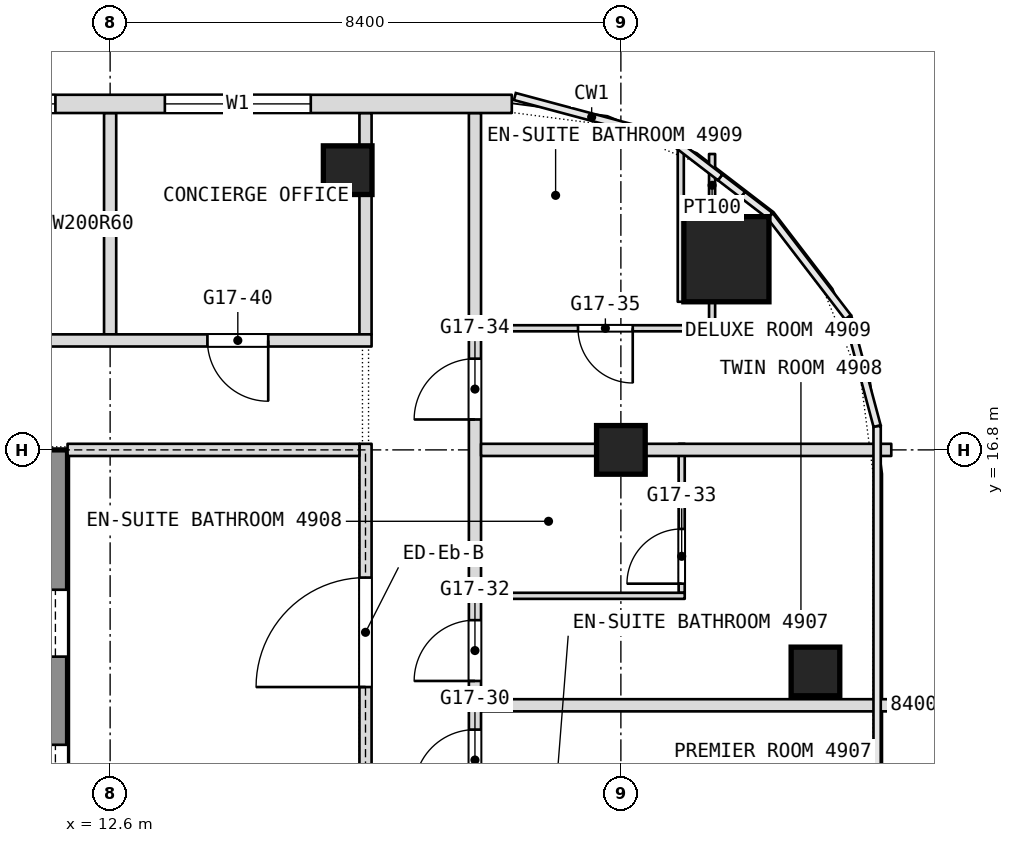
"""IFC4 building model, lengths in metres.
Left out: names, types, materials, properties, quantities, classifications, styles, units other than length and angle.
Written with IfcOpenShell. Run it as: python <this file> out.ifc"""

import sys

from ifc_helpers import new_model, si_unit, direction, frame, frame_2d, origin, origin_2d, place, context, subcontext, project, spatial, rectangle, extrude, element, fill, save


model = new_model("IFC4")
c1 = context("Model", 3, precision=1e-05, world=origin(), true_north=direction((0.0, 1.0)))
c2 = subcontext(c1, "Body", "Model", "MODEL_VIEW")
j1 = project(units=[si_unit("LENGTHUNIT", "METRE"), si_unit("PLANEANGLEUNIT", "RADIAN")], contexts=[c1])
p1 = place(None, origin())
s1 = spatial("IfcSite", under=j1, at=p1, CompositionType="ELEMENT")
p2 = place(p1, origin())
s2 = spatial("IfcBuilding", under=s1, at=p2, CompositionType="ELEMENT")
p3 = place(p2, frame((0.0, 0.0, 212.9)))
s3 = spatial("IfcBuildingStorey", under=s2, at=p3, CompositionType="ELEMENT", Elevation=212.9)
p4 = place(p3, frame((11.5, 0.0, 0.0), z_axis=(0.0, 0.0, 1.0), x_axis=(0.0, 1.0, 0.0)))
e1 = element("IfcWall", 1, at=p4, inside=s3, PredefinedType="SHEAR", context=c2, shape_type="SweptSolid", body=[
    extrude(rectangle(XDim=16.8, YDim=0.8, at=frame_2d((8.4, 0.0))), origin(), (0.0, 0.0, 1.0), 3.6),
])
p5 = place(p4, frame((2.3, 0.0, 0.0)))
e2 = element("IfcOpeningElement", 2, at=p5, cuts=e1, PredefinedType="OPENING", context=c2, shape_type="SweptSolid", body=[
    extrude(rectangle(XDim=1.1, YDim=2.1, at=frame_2d((0.55, 1.05))), frame((0.0, 0.4, 0.0), z_axis=(0.0, -1.0, 0.0), x_axis=(1.0, 0.0, 0.0)), (0.0, 0.0, 1.0), 0.8),
])
p6 = place(p4, frame((4.85, 0.0, 0.0)))
e3 = element("IfcOpeningElement", 3, at=p6, cuts=e1, PredefinedType="OPENING", context=c2, shape_type="SweptSolid", body=[
    extrude(rectangle(XDim=1.1, YDim=2.1, at=frame_2d((0.55, 1.05))), frame((0.0, 0.4, 0.0), z_axis=(0.0, -1.0, 0.0), x_axis=(1.0, 0.0, 0.0)), (0.0, 0.0, 1.0), 0.8),
])
p7 = place(p4, frame((6.825, 0.0, 0.0)))
e4 = element("IfcOpeningElement", 4, at=p7, cuts=e1, PredefinedType="OPENING", context=c2, shape_type="SweptSolid", body=[
    extrude(rectangle(XDim=1.2, YDim=2.1, at=frame_2d((0.6, 1.05))), frame((0.0, 0.4, 0.0), z_axis=(0.0, -1.0, 0.0), x_axis=(1.0, 0.0, 0.0)), (0.0, 0.0, 1.0), 0.8),
])
p8 = place(p4, frame((13.4, 0.0, 0.0)))
e5 = element("IfcOpeningElement", 5, at=p8, cuts=e1, PredefinedType="OPENING", context=c2, shape_type="SweptSolid", body=[
    extrude(rectangle(XDim=1.1, YDim=2.1, at=frame_2d((0.55, 1.05))), frame((0.0, 0.4, 0.0), z_axis=(0.0, -1.0, 0.0), x_axis=(1.0, 0.0, 0.0)), (0.0, 0.0, 1.0), 0.8),
])
p9 = place(p4, frame((10.85, 0.0, 0.0)))
e6 = element("IfcOpeningElement", 6, at=p9, cuts=e1, PredefinedType="OPENING", context=c2, shape_type="SweptSolid", body=[
    extrude(rectangle(XDim=1.1, YDim=2.1, at=frame_2d((0.55, 1.05))), frame((0.0, 0.4, 0.0), z_axis=(0.0, -1.0, 0.0), x_axis=(1.0, 0.0, 0.0)), (0.0, 0.0, 1.0), 0.8),
])
p10 = place(p4, frame((8.775, 0.0, 0.0)))
e7 = element("IfcOpeningElement", 7, at=p10, cuts=e1, PredefinedType="OPENING", context=c2, shape_type="SweptSolid", body=[
    extrude(rectangle(XDim=1.2, YDim=2.1, at=frame_2d((0.6, 1.05))), frame((0.0, 0.4, 0.0), z_axis=(0.0, -1.0, 0.0), x_axis=(1.0, 0.0, 0.0)), (0.0, 0.0, 1.0), 0.8),
])
p11 = place(p3, frame((22.736, 19.936, 0.0), z_axis=(0.0, 0.0, 1.0), x_axis=(1.0, 0.0, 0.0)))
e8 = element("IfcColumn", 8, at=p11, inside=s3, PredefinedType="COLUMN", context=c2, shape_type="SweptSolid", body=[
    extrude(rectangle(XDim=1.4, YDim=1.4, at=origin_2d()), origin(), (0.0, 0.0, 1.0), 3.6),
])
for number, where, z_axis, x_axis in (
    (9, (21.0, 16.8, 0.0), (0.0, 0.0, 1.0), (1.0, 0.0, 0.0)),
    (10, (16.507, 21.4, 0.0), (0.0, 0.0, 1.0), (1.0, 0.0, 0.0)),
    (11, (24.2, 13.156, 0.0), (0.0, 0.0, 1.0), (1.0, 0.0, 0.0)),
):
    element("IfcColumn", number, at=place(p3, frame(where, z_axis=z_axis, x_axis=x_axis)), inside=s3, PredefinedType="COLUMN", context=c2, shape_type="SweptSolid", body=[
        extrude(rectangle(XDim=0.8, YDim=0.8, at=origin_2d()), origin(), (0.0, 0.0, 1.0), 3.6),
    ])
p12 = place(p3, frame((22.5, 18.85, 0.0), z_axis=(0.0, 0.0, 1.0), x_axis=(0.0, 1.0, 0.0)))
e12 = element("IfcWall", 12, at=p12, inside=s3, PredefinedType="PARTITIONING", context=c2, shape_type="SweptSolid", body=[
    extrude(rectangle(XDim=0.386, YDim=0.1, at=frame_2d((0.193, 0.0))), origin(), (0.0, 0.0, 1.0), 3.34),
])
p13 = place(p3, frame((22.5, 20.636, 0.0), z_axis=(0.0, 0.0, 1.0), x_axis=(0.0, 1.0, 0.0)))
e13 = element("IfcWall", 13, at=p13, inside=s3, PredefinedType="PARTITIONING", context=c2, shape_type="SweptSolid", body=[
    extrude(rectangle(XDim=1.03, YDim=0.1, at=frame_2d((0.515, 0.0))), origin(), (0.0, 0.0, 1.0), 3.34),
])
p14 = place(p3, frame((22.0, 14.45, 0.0), z_axis=(0.0, 0.0, 1.0), x_axis=(0.0, 1.0, 0.0)))
e14 = element("IfcWall", 14, at=p14, inside=s3, PredefinedType="PARTITIONING", context=c2, shape_type="SweptSolid", body=[
    extrude(rectangle(XDim=2.45, YDim=0.1, at=frame_2d((1.225, 0.0))), origin(), (0.0, 0.0, 1.0), 3.34),
])
p15 = place(p14, frame((0.15, 0.0, 0.0)))
e15 = element("IfcOpeningElement", 15, at=p15, cuts=e14, PredefinedType="OPENING", context=c2, shape_type="SweptSolid", body=[
    extrude(rectangle(XDim=0.9, YDim=2.1, at=frame_2d((0.45, 1.05))), frame((0.0, 0.05, 0.0), z_axis=(0.0, -1.0, 0.0), x_axis=(1.0, 0.0, 0.0)), (0.0, 0.0, 1.0), 0.1),
])
p16 = place(p3, frame((18.6, -26.751, 0.0), z_axis=(0.0, 0.0, 1.0), x_axis=(0.0, 1.0, 0.0)))
e16 = element("IfcWall", 16, at=p16, inside=s3, PredefinedType="PARTITIONING", context=c2, shape_type="SweptSolid", body=[
    extrude(rectangle(XDim=49.091, YDim=0.2, at=frame_2d((24.545, 0.0))), origin(), (0.0, 0.0, 1.0), 3.34),
])
p17 = place(p16, frame((3.413, 0.0, 0.0)))
e17 = element("IfcOpeningElement", 17, at=p17, cuts=e16, PredefinedType="OPENING", context=c2, shape_type="SweptSolid", body=[
    extrude(rectangle(XDim=1.0, YDim=2.1, at=frame_2d((0.5, 1.05))), frame((0.0, 0.1, 0.0), z_axis=(0.0, -1.0, 0.0), x_axis=(1.0, 0.0, 0.0)), (0.0, 0.0, 1.0), 0.2),
])
p18 = place(p16, frame((5.838, 0.0, 0.0)))
e18 = element("IfcOpeningElement", 18, at=p18, cuts=e16, PredefinedType="OPENING", context=c2, shape_type="SweptSolid", body=[
    extrude(rectangle(XDim=1.0, YDim=2.1, at=frame_2d((0.5, 1.05))), frame((0.0, 0.1, 0.0), z_axis=(0.0, -1.0, 0.0), x_axis=(1.0, 0.0, 0.0)), (0.0, 0.0, 1.0), 0.2),
])
p19 = place(p16, frame((13.551, 0.0, 0.0)))
e19 = element("IfcOpeningElement", 19, at=p19, cuts=e16, PredefinedType="OPENING", context=c2, shape_type="SweptSolid", body=[
    extrude(rectangle(XDim=1.1, YDim=2.1, at=frame_2d((0.55, 1.05))), frame((0.0, 0.1, 0.0), z_axis=(0.0, -1.0, 0.0), x_axis=(1.0, 0.0, 0.0)), (0.0, 0.0, 1.0), 0.2),
])
p20 = place(p16, frame((21.151, 0.0, 0.0)))
e20 = element("IfcOpeningElement", 20, at=p20, cuts=e16, PredefinedType="OPENING", context=c2, shape_type="SweptSolid", body=[
    extrude(rectangle(XDim=1.0, YDim=2.1, at=frame_2d((0.5, 1.05))), frame((0.0, 0.1, 0.0), z_axis=(0.0, -1.0, 0.0), x_axis=(1.0, 0.0, 0.0)), (0.0, 0.0, 1.0), 0.2),
])
p21 = place(p16, frame((22.951, 0.0, 0.0)))
e21 = element("IfcOpeningElement", 21, at=p21, cuts=e16, PredefinedType="OPENING", context=c2, shape_type="SweptSolid", body=[
    extrude(rectangle(XDim=1.0, YDim=2.1, at=frame_2d((0.5, 1.05))), frame((0.0, 0.1, 0.0), z_axis=(0.0, -1.0, 0.0), x_axis=(1.0, 0.0, 0.0)), (0.0, 0.0, 1.0), 0.2),
])
p22 = place(p16, frame((30.351, 0.0, 0.0)))
e22 = element("IfcOpeningElement", 22, at=p22, cuts=e16, PredefinedType="OPENING", context=c2, shape_type="SweptSolid", body=[
    extrude(rectangle(XDim=1.1, YDim=2.1, at=frame_2d((0.55, 1.05))), frame((0.0, 0.1, 0.0), z_axis=(0.0, -1.0, 0.0), x_axis=(1.0, 0.0, 0.0)), (0.0, 0.0, 1.0), 0.2),
])
p23 = place(p16, frame((37.951, 0.0, 0.0)))
e23 = element("IfcOpeningElement", 23, at=p23, cuts=e16, PredefinedType="OPENING", context=c2, shape_type="SweptSolid", body=[
    extrude(rectangle(XDim=1.0, YDim=2.1, at=frame_2d((0.5, 1.05))), frame((0.0, 0.1, 0.0), z_axis=(0.0, -1.0, 0.0), x_axis=(1.0, 0.0, 0.0)), (0.0, 0.0, 1.0), 0.2),
])
p24 = place(p16, frame((39.751, 0.0, 0.0)))
e24 = element("IfcOpeningElement", 24, at=p24, cuts=e16, PredefinedType="OPENING", context=c2, shape_type="SweptSolid", body=[
    extrude(rectangle(XDim=1.0, YDim=2.1, at=frame_2d((0.5, 1.05))), frame((0.0, 0.1, 0.0), z_axis=(0.0, -1.0, 0.0), x_axis=(1.0, 0.0, 0.0)), (0.0, 0.0, 1.0), 0.2),
])
p25 = place(p16, frame((44.051, 0.0, 0.0)))
e25 = element("IfcOpeningElement", 25, at=p25, cuts=e16, PredefinedType="OPENING", context=c2, shape_type="SweptSolid", body=[
    extrude(rectangle(XDim=1.0, YDim=2.1, at=frame_2d((0.5, 1.05))), frame((0.0, 0.1, 0.0), z_axis=(0.0, -1.0, 0.0), x_axis=(1.0, 0.0, 0.0)), (0.0, 0.0, 1.0), 0.2),
])
for number, where, z_axis, x_axis in (
    (26, (16.8, 18.7, 0.0), (0.0, 0.0, 1.0), (0.0, 1.0, 0.0)),
    (27, (12.6, 18.7, 0.0), (0.0, 0.0, 1.0), (0.0, 1.0, 0.0)),
):
    element("IfcWall", number, at=place(p3, frame(where, z_axis=z_axis, x_axis=x_axis)), inside=s3, PredefinedType="PARTITIONING", context=c2, shape_type="SweptSolid", body=[
        extrude(rectangle(XDim=3.64, YDim=0.2, at=frame_2d((1.82, 0.0))), origin(), (0.0, 0.0, 1.0), 3.34),
    ])
p26 = place(p3, frame((18.7, 12.6, 0.0), z_axis=(0.0, 0.0, 1.0), x_axis=(1.0, 0.0, 0.0)))
e28 = element("IfcWall", 28, at=p26, inside=s3, PredefinedType="PARTITIONING", context=c2, shape_type="SweptSolid", body=[
    extrude(rectangle(XDim=6.8, YDim=0.2, at=frame_2d((3.4, 0.0))), origin(), (0.0, 0.0, 1.0), 3.34),
])
p27 = place(p3, frame((18.7, 14.4, 0.0), z_axis=(0.0, 0.0, 1.0), x_axis=(1.0, 0.0, 0.0)))
e29 = element("IfcWall", 29, at=p27, inside=s3, PredefinedType="PARTITIONING", context=c2, shape_type="SweptSolid", body=[
    extrude(rectangle(XDim=3.35, YDim=0.1, at=frame_2d((1.675, 0.0))), origin(), (0.0, 0.0, 1.0), 3.34),
])
p28 = place(p3, frame((18.7, 16.8, 0.0), z_axis=(0.0, 0.0, 1.0), x_axis=(1.0, 0.0, 0.0)))
e30 = element("IfcWall", 30, at=p28, inside=s3, PredefinedType="PARTITIONING", context=c2, shape_type="SweptSolid", body=[
    extrude(rectangle(XDim=6.747, YDim=0.2, at=frame_2d((3.374, 0.0))), origin(), (0.0, 0.0, 1.0), 2.94),
])
p29 = place(p3, frame((-16.9, 18.6, 0.0), z_axis=(0.0, 0.0, 1.0), x_axis=(1.0, 0.0, 0.0)))
e31 = element("IfcWall", 31, at=p29, inside=s3, PredefinedType="PARTITIONING", context=c2, shape_type="SweptSolid", body=[
    extrude(rectangle(XDim=33.8, YDim=0.2, at=frame_2d((16.9, 0.0))), origin(), (0.0, 0.0, 1.0), 3.34),
])
p30 = place(p29, frame((1.7, 0.0, 0.0)))
e32 = element("IfcOpeningElement", 32, at=p30, cuts=e31, PredefinedType="OPENING", context=c2, shape_type="SweptSolid", body=[
    extrude(rectangle(XDim=1.0, YDim=2.1, at=frame_2d((0.5, 1.05))), frame((0.0, 0.1, 0.0), z_axis=(0.0, -1.0, 0.0), x_axis=(1.0, 0.0, 0.0)), (0.0, 0.0, 1.0), 0.2),
])
p31 = place(p29, frame((7.6, 0.0, 0.0)))
e33 = element("IfcOpeningElement", 33, at=p31, cuts=e31, PredefinedType="OPENING", context=c2, shape_type="SweptSolid", body=[
    extrude(rectangle(XDim=1.8, YDim=2.1, at=frame_2d((0.9, 1.05))), frame((0.0, 0.1, 0.0), z_axis=(0.0, -1.0, 0.0), x_axis=(1.0, 0.0, 0.0)), (0.0, 0.0, 1.0), 0.2),
])
p32 = place(p29, frame((16.0, 0.0, 0.0)))
e34 = element("IfcOpeningElement", 34, at=p32, cuts=e31, PredefinedType="OPENING", context=c2, shape_type="SweptSolid", body=[
    extrude(rectangle(XDim=1.8, YDim=2.1, at=frame_2d((0.9, 1.05))), frame((0.0, 0.1, 0.0), z_axis=(0.0, -1.0, 0.0), x_axis=(1.0, 0.0, 0.0)), (0.0, 0.0, 1.0), 0.2),
])
p33 = place(p29, frame((24.4, 0.0, 0.0)))
e35 = element("IfcOpeningElement", 35, at=p33, cuts=e31, PredefinedType="OPENING", context=c2, shape_type="SweptSolid", body=[
    extrude(rectangle(XDim=1.8, YDim=2.1, at=frame_2d((0.9, 1.05))), frame((0.0, 0.1, 0.0), z_axis=(0.0, -1.0, 0.0), x_axis=(1.0, 0.0, 0.0)), (0.0, 0.0, 1.0), 0.2),
])
p34 = place(p29, frame((31.1, 0.0, 0.0)))
e36 = element("IfcOpeningElement", 36, at=p34, cuts=e31, PredefinedType="OPENING", context=c2, shape_type="SweptSolid", body=[
    extrude(rectangle(XDim=1.0, YDim=2.1, at=frame_2d((0.5, 1.05))), frame((0.0, 0.1, 0.0), z_axis=(0.0, -1.0, 0.0), x_axis=(1.0, 0.0, 0.0)), (0.0, 0.0, 1.0), 0.2),
])
p35 = place(p3, frame((18.7, 18.8, 0.0), z_axis=(0.0, 0.0, 1.0), x_axis=(1.0, 0.0, 0.0)))
e37 = element("IfcWall", 37, at=p35, inside=s3, PredefinedType="PARTITIONING", context=c2, shape_type="SweptSolid", body=[
    extrude(rectangle(XDim=3.85, YDim=0.1, at=frame_2d((1.925, 0.0))), origin(), (0.0, 0.0, 1.0), 3.34),
])
p36 = place(p35, frame((1.595, 0.0, 0.0)))
e38 = element("IfcOpeningElement", 38, at=p36, cuts=e37, PredefinedType="OPENING", context=c2, shape_type="SweptSolid", body=[
    extrude(rectangle(XDim=0.9, YDim=2.1, at=frame_2d((0.45, 1.05))), frame((0.0, 0.05, 0.0), z_axis=(0.0, -1.0, 0.0), x_axis=(1.0, 0.0, 0.0)), (0.0, 0.0, 1.0), 0.1),
])
p37 = place(p3, frame((21.985, 19.236, 0.0), z_axis=(0.0, 0.0, 1.0), x_axis=(0.0, 1.0, 0.0)))
e39 = element("IfcWall", 39, at=p37, inside=s3, PredefinedType="PARTITIONING", context=c2, shape_type="SweptSolid", body=[
    extrude(rectangle(XDim=2.513, YDim=0.1, at=frame_2d((1.256, 0.0))), origin(), (0.0, 0.0, 1.0), 3.34),
])
p38 = place(p3, frame((19.206, 22.49, 0.0), z_axis=(0.0, 0.0, 1.0), x_axis=(-1.0, 0.0, 0.0)))
e40 = element("IfcWall", 40, at=p38, inside=s3, PredefinedType="NOTDEFINED", context=c2, shape_type="SweptSolid", body=[
    extrude(rectangle(XDim=38.412, YDim=0.3, at=frame_2d((19.206, 0.0))), origin(), (0.0, 0.0, 1.0), 3.6),
])
p39 = place(p38, frame((3.306, 0.0, 0.9)))
e41 = element("IfcOpeningElement", 41, at=p39, cuts=e40, PredefinedType="OPENING", context=c2, shape_type="SweptSolid", body=[
    extrude(rectangle(XDim=2.4, YDim=2.1, at=frame_2d((1.2, 1.05))), frame((0.0, 0.15, 0.0), z_axis=(0.0, -1.0, 0.0), x_axis=(1.0, 0.0, 0.0)), (0.0, 0.0, 1.0), 0.3),
])
p40 = place(p38, frame((7.506, 0.0, 0.9)))
e42 = element("IfcOpeningElement", 42, at=p40, cuts=e40, PredefinedType="OPENING", context=c2, shape_type="SweptSolid", body=[
    extrude(rectangle(XDim=2.4, YDim=2.1, at=frame_2d((1.2, 1.05))), frame((0.0, 0.15, 0.0), z_axis=(0.0, -1.0, 0.0), x_axis=(1.0, 0.0, 0.0)), (0.0, 0.0, 1.0), 0.3),
])
p41 = place(p38, frame((11.706, 0.0, 0.9)))
e43 = element("IfcOpeningElement", 43, at=p41, cuts=e40, PredefinedType="OPENING", context=c2, shape_type="SweptSolid", body=[
    extrude(rectangle(XDim=2.4, YDim=2.1, at=frame_2d((1.2, 1.05))), frame((0.0, 0.15, 0.0), z_axis=(0.0, -1.0, 0.0), x_axis=(1.0, 0.0, 0.0)), (0.0, 0.0, 1.0), 0.3),
])
p42 = place(p38, frame((15.906, 0.0, 0.9)))
e44 = element("IfcOpeningElement", 44, at=p42, cuts=e40, PredefinedType="OPENING", context=c2, shape_type="SweptSolid", body=[
    extrude(rectangle(XDim=2.4, YDim=2.1, at=frame_2d((1.2, 1.05))), frame((0.0, 0.15, 0.0), z_axis=(0.0, -1.0, 0.0), x_axis=(1.0, 0.0, 0.0)), (0.0, 0.0, 1.0), 0.3),
])
p43 = place(p38, frame((20.106, 0.0, 0.9)))
e45 = element("IfcOpeningElement", 45, at=p43, cuts=e40, PredefinedType="OPENING", context=c2, shape_type="SweptSolid", body=[
    extrude(rectangle(XDim=2.4, YDim=2.1, at=frame_2d((1.2, 1.05))), frame((0.0, 0.15, 0.0), z_axis=(0.0, -1.0, 0.0), x_axis=(1.0, 0.0, 0.0)), (0.0, 0.0, 1.0), 0.3),
])
p44 = place(p38, frame((24.306, 0.0, 0.9)))
e46 = element("IfcOpeningElement", 46, at=p44, cuts=e40, PredefinedType="OPENING", context=c2, shape_type="SweptSolid", body=[
    extrude(rectangle(XDim=2.4, YDim=2.1, at=frame_2d((1.2, 1.05))), frame((0.0, 0.15, 0.0), z_axis=(0.0, -1.0, 0.0), x_axis=(1.0, 0.0, 0.0)), (0.0, 0.0, 1.0), 0.3),
])
p45 = place(p38, frame((28.506, 0.0, 0.9)))
e47 = element("IfcOpeningElement", 47, at=p45, cuts=e40, PredefinedType="OPENING", context=c2, shape_type="SweptSolid", body=[
    extrude(rectangle(XDim=2.4, YDim=2.1, at=frame_2d((1.2, 1.05))), frame((0.0, 0.15, 0.0), z_axis=(0.0, -1.0, 0.0), x_axis=(1.0, 0.0, 0.0)), (0.0, 0.0, 1.0), 0.3),
])
p46 = place(p38, frame((32.706, 0.0, 0.9)))
e48 = element("IfcOpeningElement", 48, at=p46, cuts=e40, PredefinedType="OPENING", context=c2, shape_type="SweptSolid", body=[
    extrude(rectangle(XDim=2.4, YDim=2.1, at=frame_2d((1.2, 1.05))), frame((0.0, 0.15, 0.0), z_axis=(0.0, -1.0, 0.0), x_axis=(1.0, 0.0, 0.0)), (0.0, 0.0, 1.0), 0.3),
])
p47 = place(p3, frame((16.8, -0.1, 0.0), z_axis=(0.0, 0.0, 1.0), x_axis=(0.0, 1.0, 0.0)))
e49 = element("IfcWall", 49, at=p47, inside=s3, PredefinedType="PARTITIONING", context=c2, shape_type="SweptSolid", body=[
    extrude(rectangle(XDim=17.0, YDim=0.2, at=frame_2d((8.5, 0.0))), origin(), (0.0, 0.0, 1.0), 3.34),
])
p48 = place(p47, frame((2.2, 0.0, 0.0)))
e50 = element("IfcOpeningElement", 50, at=p48, cuts=e49, PredefinedType="OPENING", context=c2, shape_type="SweptSolid", body=[
    extrude(rectangle(XDim=1.8, YDim=2.1, at=frame_2d((0.9, 1.05))), frame((0.0, 0.1, 0.0), z_axis=(0.0, -1.0, 0.0), x_axis=(1.0, 0.0, 0.0)), (0.0, 0.0, 1.0), 0.2),
])
p49 = place(p47, frame((13.0, 0.0, 0.0)))
e51 = element("IfcOpeningElement", 51, at=p49, cuts=e49, PredefinedType="OPENING", context=c2, shape_type="SweptSolid", body=[
    extrude(rectangle(XDim=1.8, YDim=2.1, at=frame_2d((0.9, 1.05))), frame((0.0, 0.1, 0.0), z_axis=(0.0, -1.0, 0.0), x_axis=(1.0, 0.0, 0.0)), (0.0, 0.0, 1.0), 0.2),
])
p50 = place(p3, frame((11.9, 16.8, 0.0), z_axis=(0.0, 0.0, 1.0), x_axis=(1.0, 0.0, 0.0)))
e52 = element("IfcWall", 52, at=p50, inside=s3, PredefinedType="PARTITIONING", context=c2, shape_type="SweptSolid", body=[
    extrude(rectangle(XDim=4.8, YDim=0.2, at=frame_2d((2.4, 0.0))), origin(), (0.0, 0.0, 1.0), 2.94),
])
p51 = place(p15, origin())
e53 = element("IfcDoor", 53, at=p51, inside=s3, OperationType="SINGLE_SWING_LEFT", PredefinedType="DOOR", context=c2, shape_type="SweptSolid", body=[
    extrude(rectangle(XDim=0.9, YDim=2.1, at=frame_2d((0.45, 1.05))), frame((0.0, 0.025, 0.0), z_axis=(0.0, -1.0, 0.0), x_axis=(1.0, 0.0, 0.0)), (0.0, 0.0, 1.0), 0.05),
])
fill(e15, e53)
p52 = place(p23, origin())
e54 = element("IfcDoor", 54, at=p52, inside=s3, OperationType="SINGLE_SWING_RIGHT", PredefinedType="DOOR", context=c2, shape_type="SweptSolid", body=[
    extrude(rectangle(XDim=1.0, YDim=2.1, at=frame_2d((0.5, 1.05))), frame((0.0, 0.025, 0.0), z_axis=(0.0, -1.0, 0.0), x_axis=(1.0, 0.0, 0.0)), (0.0, 0.0, 1.0), 0.05),
])
fill(e23, e54)
p53 = place(p24, origin())
e55 = element("IfcDoor", 55, at=p53, inside=s3, OperationType="SINGLE_SWING_RIGHT", PredefinedType="DOOR", context=c2, shape_type="SweptSolid", body=[
    extrude(rectangle(XDim=1.0, YDim=2.1, at=frame_2d((0.5, 1.05))), frame((0.0, 0.025, 0.0), z_axis=(0.0, -1.0, 0.0), x_axis=(1.0, 0.0, 0.0)), (0.0, 0.0, 1.0), 0.05),
])
fill(e24, e55)
p54 = place(p25, origin())
e56 = element("IfcDoor", 56, at=p54, inside=s3, OperationType="SINGLE_SWING_RIGHT", PredefinedType="DOOR", context=c2, shape_type="SweptSolid", body=[
    extrude(rectangle(XDim=1.0, YDim=2.1, at=frame_2d((0.5, 1.05))), frame((0.0, 0.025, 0.0), z_axis=(0.0, -1.0, 0.0), x_axis=(1.0, 0.0, 0.0)), (0.0, 0.0, 1.0), 0.05),
])
fill(e25, e56)
p55 = place(p34, origin())
e57 = element("IfcDoor", 57, at=p55, inside=s3, OperationType="SINGLE_SWING_RIGHT", PredefinedType="DOOR", context=c2, shape_type="SweptSolid", body=[
    extrude(rectangle(XDim=1.0, YDim=2.1, at=frame_2d((0.5, 1.05))), frame((0.0, 0.025, 0.0), z_axis=(0.0, -1.0, 0.0), x_axis=(1.0, 0.0, 0.0)), (0.0, 0.0, 1.0), 0.05),
])
fill(e36, e57)
p56 = place(p36, origin())
e58 = element("IfcDoor", 58, at=p56, inside=s3, OperationType="SINGLE_SWING_RIGHT", PredefinedType="DOOR", context=c2, shape_type="SweptSolid", body=[
    extrude(rectangle(XDim=0.9, YDim=2.1, at=frame_2d((0.45, 1.05))), frame((0.0, 0.025, 0.0), z_axis=(0.0, -1.0, 0.0), x_axis=(1.0, 0.0, 0.0)), (0.0, 0.0, 1.0), 0.05),
])
fill(e38, e58)
p57 = place(p39, origin())
e59 = element("IfcWindow", 59, at=p57, inside=s3, PartitioningType="SINGLE_PANEL", PredefinedType="WINDOW", context=c2, shape_type="SweptSolid", body=[
    extrude(rectangle(XDim=2.4, YDim=2.1, at=frame_2d((1.2, 1.05))), frame((0.0, 0.03, 0.0), z_axis=(0.0, -1.0, 0.0), x_axis=(1.0, 0.0, 0.0)), (0.0, 0.0, 1.0), 0.06),
])
fill(e41, e59)
p58 = place(p40, origin())
e60 = element("IfcWindow", 60, at=p58, inside=s3, PartitioningType="SINGLE_PANEL", PredefinedType="WINDOW", context=c2, shape_type="SweptSolid", body=[
    extrude(rectangle(XDim=2.4, YDim=2.1, at=frame_2d((1.2, 1.05))), frame((0.0, 0.03, 0.0), z_axis=(0.0, -1.0, 0.0), x_axis=(1.0, 0.0, 0.0)), (0.0, 0.0, 1.0), 0.06),
])
fill(e42, e60)
p59 = place(p49, origin())
e61 = element("IfcDoor", 61, at=p59, inside=s3, OperationType="DOUBLE_DOOR_SINGLE_SWING", PredefinedType="DOOR", context=c2, shape_type="SweptSolid", body=[
    extrude(rectangle(XDim=1.8, YDim=2.1, at=frame_2d((0.9, 1.05))), frame((0.0, 0.025, 0.0), z_axis=(0.0, -1.0, 0.0), x_axis=(1.0, 0.0, 0.0)), (0.0, 0.0, 1.0), 0.05),
])
fill(e51, e61)
save(model, sys.argv[1])
